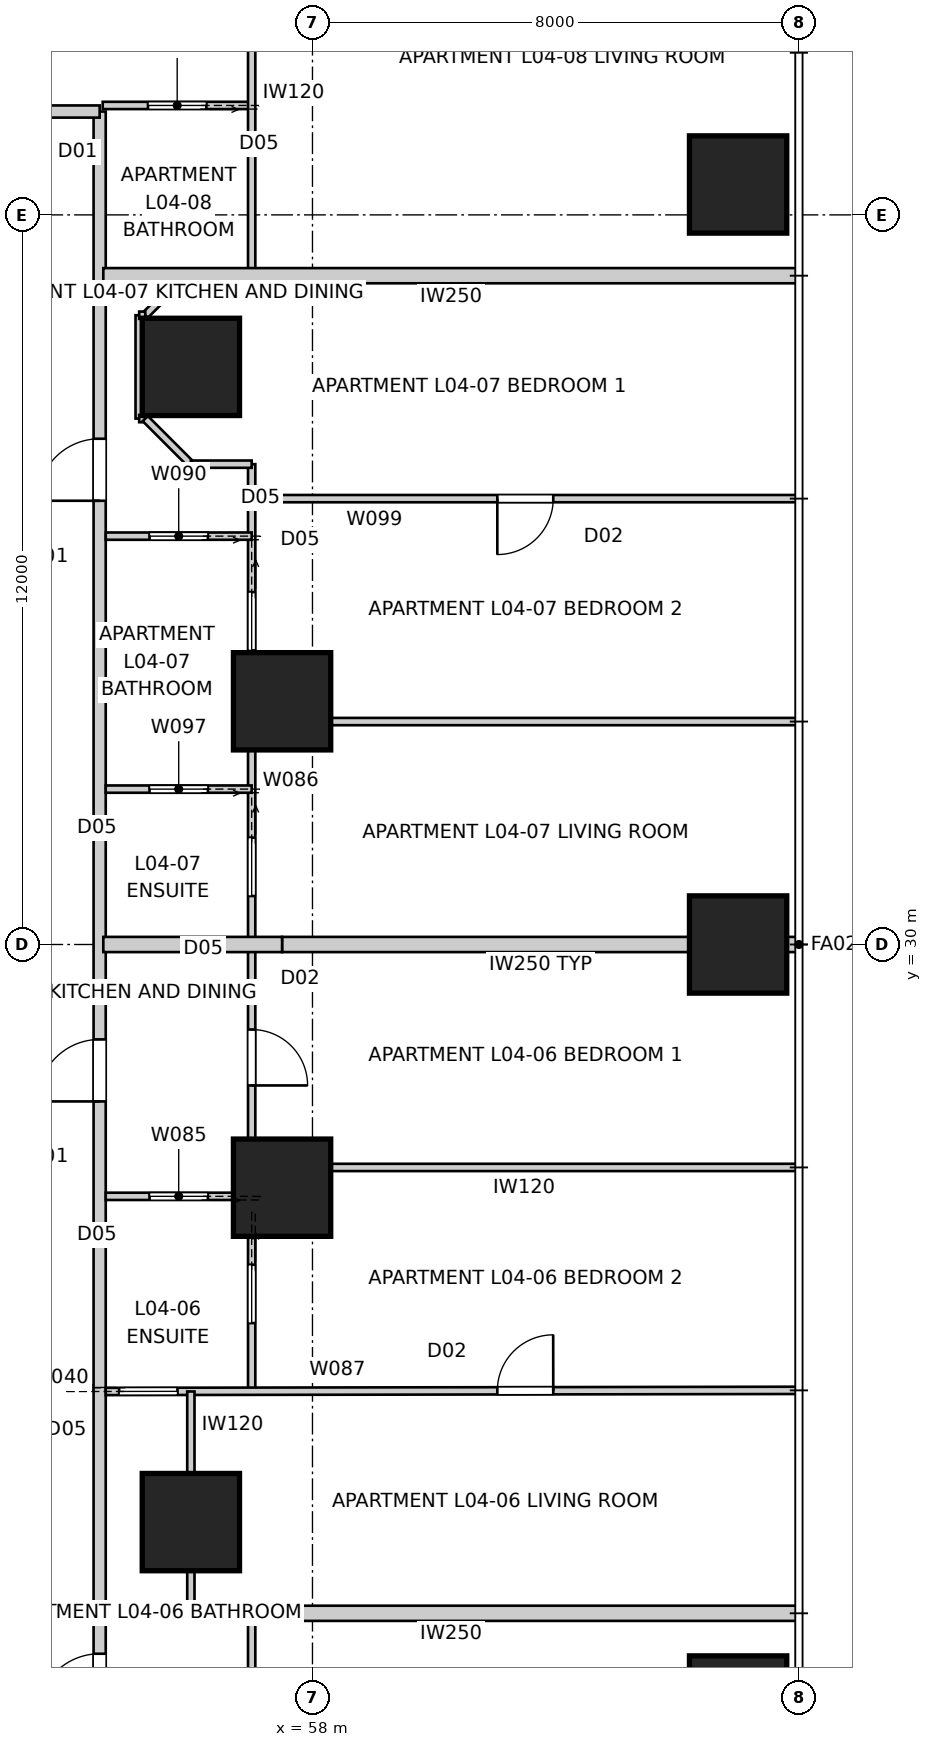
"""IFC4 building model, lengths in metres.
Left out: names, types, materials, properties, quantities, classifications, styles, units other than length and angle.
Written with IfcOpenShell. Run it as: python <this file> out.ifc"""

import sys

from ifc_helpers import new_model, si_unit, direction, frame, frame_2d, origin, origin_2d, place, context, subcontext, project, spatial, rectangle, extrude, element, fill, save


model = new_model("IFC4")
c1 = context("Model", 3, precision=1e-05, world=origin(), true_north=direction((0.0, 1.0)))
c2 = subcontext(c1, "Body", "Model", "MODEL_VIEW")
j1 = project(units=[si_unit("LENGTHUNIT", "METRE"), si_unit("PLANEANGLEUNIT", "RADIAN")], contexts=[c1])
p1 = place(None, origin())
s1 = spatial("IfcSite", under=j1, at=p1, CompositionType="ELEMENT")
p2 = place(p1, origin())
s2 = spatial("IfcBuilding", under=s1, at=p2, CompositionType="ELEMENT")
p3 = place(p2, frame((0.0, 0.0, 18.4)))
s3 = spatial("IfcBuildingStorey", under=s2, at=p3, CompositionType="ELEMENT", Elevation=18.4)
for number, where, z_axis, x_axis in (
    (1, (65.0, 17.5, 0.0), (0.0, 0.0, 1.0), (1.0, 0.0, 0.0)),
    (2, (65.0, 30.0, 0.0), (0.0, 0.0, 1.0), (1.0, 0.0, 0.0)),
    (3, (65.0, 42.5, 0.0), (0.0, 0.0, 1.0), (1.0, 0.0, 0.0)),
    (4, (57.5, 26.0, 0.0), (0.0, 0.0, 1.0), (1.0, 0.0, 0.0)),
    (5, (57.5, 34.0, 0.0), (0.0, 0.0, 1.0), (1.0, 0.0, 0.0)),
    (6, (56.0, 39.5, 0.0), (0.0, 0.0, 1.0), (1.0, 0.0, 0.0)),
    (7, (56.0, 20.5, 0.0), (0.0, 0.0, 1.0), (1.0, 0.0, 0.0)),
):
    element("IfcColumn", number, at=place(p3, frame(where, z_axis=z_axis, x_axis=x_axis)), inside=s3, PredefinedType="COLUMN", context=c2, shape_type="SweptSolid", body=[
        extrude(rectangle(XDim=1.6, YDim=1.6, at=origin_2d()), origin(), (0.0, 0.0, 1.0), 3.4),
    ])
p4 = place(p3, frame((54.5, 16.3, 0.0), z_axis=(0.0, 0.0, 1.0), x_axis=(0.0, 1.0, 0.0)))
e8 = element("IfcWall", 8, at=p4, inside=s3, PredefinedType="PARTITIONING", context=c2, shape_type="SweptSolid", body=[
    extrude(rectangle(XDim=27.4, YDim=0.2, at=frame_2d((13.7, 0.0))), origin(), (0.0, 0.0, 1.0), 3.25),
])
p5 = place(p4, frame((20.998, 0.0, 0.0)))
e9 = element("IfcOpeningElement", 9, at=p5, cuts=e8, PredefinedType="OPENING", context=c2, shape_type="SweptSolid", body=[
    extrude(rectangle(XDim=1.02, YDim=2.34, at=frame_2d((0.51, 1.17))), frame((0.0, 0.11, 0.0), z_axis=(0.0, -1.0, 0.0), x_axis=(1.0, 0.0, 0.0)), (0.0, 0.0, 1.0), 0.22),
])
p6 = place(p4, frame((11.119, 0.0, 0.0)))
e10 = element("IfcOpeningElement", 10, at=p6, cuts=e8, PredefinedType="OPENING", context=c2, shape_type="SweptSolid", body=[
    extrude(rectangle(XDim=1.02, YDim=2.34, at=frame_2d((0.51, 1.17))), frame((0.0, 0.11, 0.0), z_axis=(0.0, -1.0, 0.0), x_axis=(1.0, 0.0, 0.0)), (0.0, 0.0, 1.0), 0.22),
])
p7 = place(p4, frame((1.015, 0.0, 0.0)))
e11 = element("IfcOpeningElement", 11, at=p7, cuts=e8, PredefinedType="OPENING", context=c2, shape_type="SweptSolid", body=[
    extrude(rectangle(XDim=1.02, YDim=2.34, at=frame_2d((0.51, 1.17))), frame((0.0, 0.11, 0.0), z_axis=(0.0, -1.0, 0.0), x_axis=(1.0, 0.0, 0.0)), (0.0, 0.0, 1.0), 0.22),
])
p8 = place(p3, frame((54.5, 43.7, 0.0), z_axis=(0.0, 0.0, 1.0), x_axis=(-1.0, 0.0, 0.0)))
e12 = element("IfcWall", 12, at=p8, inside=s3, PredefinedType="PARTITIONING", context=c2, shape_type="SweptSolid", body=[
    extrude(rectangle(XDim=29.0, YDim=0.2, at=frame_2d((14.5, 0.0))), origin(), (0.0, 0.0, 1.0), 3.25),
])
p9 = place(p8, frame((22.253, 0.0, 0.0)))
e13 = element("IfcOpeningElement", 13, at=p9, cuts=e12, PredefinedType="OPENING", context=c2, shape_type="SweptSolid", body=[
    extrude(rectangle(XDim=1.02, YDim=2.34, at=frame_2d((0.51, 1.17))), frame((0.0, 0.11, 0.0), z_axis=(0.0, -1.0, 0.0), x_axis=(1.0, 0.0, 0.0)), (0.0, 0.0, 1.0), 0.22),
])
p10 = place(p8, frame((5.393, 0.0, 0.0)))
e14 = element("IfcOpeningElement", 14, at=p10, cuts=e12, PredefinedType="OPENING", context=c2, shape_type="SweptSolid", body=[
    extrude(rectangle(XDim=1.02, YDim=2.34, at=frame_2d((0.51, 1.17))), frame((0.0, 0.11, 0.0), z_axis=(0.0, -1.0, 0.0), x_axis=(1.0, 0.0, 0.0)), (0.0, 0.0, 1.0), 0.22),
])
p11 = place(p8, frame((1.281, 0.0, 0.0)))
e15 = element("IfcOpeningElement", 15, at=p11, cuts=e12, PredefinedType="OPENING", context=c2, shape_type="SweptSolid", body=[
    extrude(rectangle(XDim=1.02, YDim=2.34, at=frame_2d((0.51, 1.17))), frame((0.0, 0.11, 0.0), z_axis=(0.0, -1.0, 0.0), x_axis=(1.0, 0.0, 0.0)), (0.0, 0.0, 1.0), 0.22),
])
for number, where, z_axis, x_axis in (
    (16, (66.0, 19.0, 0.0), (0.0, 0.0, 1.0), (-1.0, 0.0, 0.0)),
    (17, (66.0, 41.0, 0.0), (0.0, 0.0, 1.0), (-1.0, 0.0, 0.0)),
):
    element("IfcWall", number, at=place(p3, frame(where, z_axis=z_axis, x_axis=x_axis)), inside=s3, PredefinedType="PARTITIONING", context=c2, shape_type="SweptSolid", body=[
        extrude(rectangle(XDim=11.44, YDim=0.25, at=frame_2d((5.72, 0.0))), origin(), (0.0, 0.0, 1.0), 3.25),
    ])
p12 = place(p3, frame((66.0, 30.0, 0.0), z_axis=(0.0, 0.0, 1.0), x_axis=(-1.0, 0.0, 0.0)))
e18 = element("IfcWall", 18, at=p12, inside=s3, PredefinedType="PARTITIONING", context=c2, shape_type="SweptSolid", body=[
    extrude(rectangle(XDim=8.5, YDim=0.25, at=frame_2d((4.25, 0.0))), origin(), (0.0, 0.0, 1.0), 3.25),
])
p13 = place(p3, frame((57.5, 30.0, 0.0), z_axis=(0.0, 0.0, 1.0), x_axis=(-1.0, 0.0, 0.0)))
e19 = element("IfcWall", 19, at=p13, inside=s3, PredefinedType="PARTITIONING", context=c2, shape_type="SweptSolid", body=[
    extrude(rectangle(XDim=2.94, YDim=0.25, at=frame_2d((1.47, 0.0))), origin(), (0.0, 0.0, 1.0), 2.795),
])
p14 = place(p3, frame((57.0, 19.0, 0.0), z_axis=(0.0, 0.0, 1.0), x_axis=(0.0, -1.0, 0.0)))
e20 = element("IfcWall", 20, at=p14, inside=s3, PredefinedType="PARTITIONING", context=c2, shape_type="SweptSolid", body=[
    extrude(rectangle(XDim=6.0, YDim=0.12, at=frame_2d((3.0, 0.0))), origin(), (0.0, 0.0, 1.0), 3.25),
])
p15 = place(p14, frame((2.54, 0.0, 0.0)))
e21 = element("IfcOpeningElement", 21, at=p15, cuts=e20, PredefinedType="OPENING", context=c2, shape_type="SweptSolid", body=[
    extrude(rectangle(XDim=0.92, YDim=2.34, at=frame_2d((0.46, 1.17))), frame((0.0, 0.07, 0.0), z_axis=(0.0, -1.0, 0.0), x_axis=(1.0, 0.0, 0.0)), (0.0, 0.0, 1.0), 0.14),
])
p16 = place(p3, frame((57.0, 25.858, 0.0), z_axis=(0.0, 0.0, 1.0), x_axis=(-1.0, 0.0, 0.0)))
e22 = element("IfcWall", 22, at=p16, inside=s3, PredefinedType="PARTITIONING", context=c2, shape_type="SweptSolid", body=[
    extrude(rectangle(XDim=2.4, YDim=0.12, at=frame_2d((1.2, 0.0))), origin(), (0.0, 0.0, 1.0), 3.25),
])
p17 = place(p16, frame((0.72, 0.0, 0.0)))
e23 = element("IfcOpeningElement", 23, at=p17, cuts=e22, PredefinedType="OPENING", context=c2, shape_type="SweptSolid", body=[
    extrude(rectangle(XDim=0.96, YDim=2.1, at=frame_2d((0.48, 1.05))), frame((0.0, 0.07, 0.0), z_axis=(0.0, -1.0, 0.0), x_axis=(1.0, 0.0, 0.0)), (0.0, 0.0, 1.0), 0.14),
])
p18 = place(p3, frame((57.0, 37.9, 0.0), z_axis=(0.0, 0.0, 1.0), x_axis=(0.0, -1.0, 0.0)))
e24 = element("IfcWall", 24, at=p18, inside=s3, PredefinedType="PARTITIONING", context=c2, shape_type="SweptSolid", body=[
    extrude(rectangle(XDim=15.251, YDim=0.12, at=frame_2d((7.625, 0.0))), origin(), (0.0, 0.0, 1.0), 2.55),
])
p19 = place(p18, frame((9.298, 0.0, 0.0)))
e25 = element("IfcOpeningElement", 25, at=p19, cuts=e24, PredefinedType="OPENING", context=c2, shape_type="SweptSolid", body=[
    extrude(rectangle(XDim=0.92, YDim=2.34, at=frame_2d((0.46, 1.17))), frame((0.0, 0.07, 0.0), z_axis=(0.0, -1.0, 0.0), x_axis=(1.0, 0.0, 0.0)), (0.0, 0.0, 1.0), 0.14),
])
p20 = place(p18, frame((2.104, 0.0, 0.0)))
e26 = element("IfcOpeningElement", 26, at=p20, cuts=e24, PredefinedType="OPENING", context=c2, shape_type="SweptSolid", body=[
    extrude(rectangle(XDim=0.96, YDim=2.1, at=frame_2d((0.48, 1.05))), frame((0.0, 0.07, 0.0), z_axis=(0.0, -1.0, 0.0), x_axis=(1.0, 0.0, 0.0)), (0.0, 0.0, 1.0), 0.14),
])
p21 = place(p18, frame((13.167, 0.0, 0.0)))
e27 = element("IfcOpeningElement", 27, at=p21, cuts=e24, PredefinedType="OPENING", context=c2, shape_type="SweptSolid", body=[
    extrude(rectangle(XDim=0.96, YDim=2.1, at=frame_2d((0.48, 1.05))), frame((0.0, 0.07, 0.0), z_axis=(0.0, -1.0, 0.0), x_axis=(1.0, 0.0, 0.0)), (0.0, 0.0, 1.0), 0.14),
])
p22 = place(p18, frame((6.142, 0.0, 0.0)))
e28 = element("IfcOpeningElement", 28, at=p22, cuts=e24, PredefinedType="OPENING", context=c2, shape_type="SweptSolid", body=[
    extrude(rectangle(XDim=0.96, YDim=2.1, at=frame_2d((0.48, 1.05))), frame((0.0, 0.07, 0.0), z_axis=(0.0, -1.0, 0.0), x_axis=(1.0, 0.0, 0.0)), (0.0, 0.0, 1.0), 0.14),
])
p23 = place(p3, frame((54.6, 22.649, 0.0), z_axis=(0.0, 0.0, 1.0), x_axis=(0.999998735361, 0.001590369792, 0.0)))
e29 = element("IfcWall", 29, at=p23, inside=s3, PredefinedType="PARTITIONING", context=c2, shape_type="SweptSolid", body=[
    extrude(rectangle(XDim=11.36, YDim=0.12, at=frame_2d((5.68, 0.0))), origin(), (0.0, 0.0, 1.0), 3.25),
])
p24 = place(p23, frame((0.22, 0.0, 0.0)))
e30 = element("IfcOpeningElement", 30, at=p24, cuts=e29, PredefinedType="OPENING", context=c2, shape_type="SweptSolid", body=[
    extrude(rectangle(XDim=0.96, YDim=2.1, at=frame_2d((0.48, 1.05))), frame((0.0, 0.07, 0.0), z_axis=(0.0, -1.0, 0.0), x_axis=(1.0, 0.0, 0.0)), (0.0, 0.0, 1.0), 0.14),
])
p25 = place(p23, frame((6.44, 0.0, 0.0)))
e31 = element("IfcOpeningElement", 31, at=p25, cuts=e29, PredefinedType="OPENING", context=c2, shape_type="SweptSolid", body=[
    extrude(rectangle(XDim=0.92, YDim=2.34, at=frame_2d((0.46, 1.17))), frame((0.0, 0.07, 0.0), z_axis=(0.0, -1.0, 0.0), x_axis=(1.0, 0.0, 0.0)), (0.0, 0.0, 1.0), 0.14),
])
p26 = place(p3, frame((56.0, 22.649, 0.0), z_axis=(0.0, 0.0, 1.0), x_axis=(0.0, -1.0, 0.0)))
e32 = element("IfcWall", 32, at=p26, inside=s3, PredefinedType="PARTITIONING", context=c2, shape_type="SweptSolid", body=[
    extrude(rectangle(XDim=3.649, YDim=0.12, at=frame_2d((1.824, 0.0))), origin(), (0.0, 0.0, 1.0), 2.55),
])
p27 = place(p3, frame((65.96, 26.333, 0.0), z_axis=(0.0, 0.0, 1.0), x_axis=(-1.0, 0.0, 0.0)))
e33 = element("IfcWall", 33, at=p27, inside=s3, PredefinedType="PARTITIONING", context=c2, shape_type="SweptSolid", body=[
    extrude(rectangle(XDim=8.96, YDim=0.12, at=frame_2d((4.48, 0.0))), origin(), (0.0, 0.0, 1.0), 3.25),
])
p28 = place(p3, frame((57.0, 36.716, 0.0), z_axis=(0.0, 0.0, 1.0), x_axis=(-1.0, 0.0, 0.0)))
e34 = element("IfcWall", 34, at=p28, inside=s3, PredefinedType="PARTITIONING", context=c2, shape_type="SweptSolid", body=[
    extrude(rectangle(XDim=2.4, YDim=0.12, at=frame_2d((1.2, 0.0))), origin(), (0.0, 0.0, 1.0), 3.25),
])
p29 = place(p28, frame((0.72, 0.0, 0.0)))
e35 = element("IfcOpeningElement", 35, at=p29, cuts=e34, PredefinedType="OPENING", context=c2, shape_type="SweptSolid", body=[
    extrude(rectangle(XDim=0.96, YDim=2.1, at=frame_2d((0.48, 1.05))), frame((0.0, 0.07, 0.0), z_axis=(0.0, -1.0, 0.0), x_axis=(1.0, 0.0, 0.0)), (0.0, 0.0, 1.0), 0.14),
])
p30 = place(p3, frame((55.9, 41.0, 0.0), z_axis=(0.0, 0.0, 1.0), x_axis=(-0.707106781187, -0.707106781187, 0.0)))
e36 = element("IfcWall", 36, at=p30, inside=s3, PredefinedType="PARTITIONING", context=c2, shape_type="SweptSolid", body=[
    extrude(rectangle(XDim=0.919, YDim=0.12, at=frame_2d((0.459, 0.0))), origin(), (0.0, 0.0, 1.0), 3.25),
])
p31 = place(p3, frame((55.15, 40.35, 0.0), z_axis=(0.0, 0.0, 1.0), x_axis=(0.0, -1.0, 0.0)))
e37 = element("IfcWall", 37, at=p31, inside=s3, PredefinedType="PARTITIONING", context=c2, shape_type="SweptSolid", body=[
    extrude(rectangle(XDim=1.7, YDim=0.12, at=frame_2d((0.85, 0.0))), origin(), (0.0, 0.0, 1.0), 3.25),
])
p32 = place(p3, frame((55.25, 38.65, 0.0), z_axis=(0.0, 0.0, 1.0), x_axis=(0.707106781187, -0.707106781187, 0.0)))
e38 = element("IfcWall", 38, at=p32, inside=s3, PredefinedType="PARTITIONING", context=c2, shape_type="SweptSolid", body=[
    extrude(rectangle(XDim=1.061, YDim=0.12, at=frame_2d((0.53, 0.0))), origin(), (0.0, 0.0, 1.0), 3.25),
])
p33 = place(p3, frame((56.0, 37.9, 0.0), z_axis=(0.0, 0.0, 1.0), x_axis=(1.0, 0.0, 0.0)))
e39 = element("IfcWall", 39, at=p33, inside=s3, PredefinedType="PARTITIONING", context=c2, shape_type="SweptSolid", body=[
    extrude(rectangle(XDim=1.0, YDim=0.12, at=frame_2d((0.5, 0.0))), origin(), (0.0, 0.0, 1.0), 3.25),
])
p34 = place(p3, frame((57.0, 32.555, 0.0), z_axis=(0.0, 0.0, 1.0), x_axis=(-1.0, 0.0, 0.0)))
e40 = element("IfcWall", 40, at=p34, inside=s3, PredefinedType="PARTITIONING", context=c2, shape_type="SweptSolid", body=[
    extrude(rectangle(XDim=2.4, YDim=0.12, at=frame_2d((1.2, 0.0))), origin(), (0.0, 0.0, 1.0), 3.25),
])
p35 = place(p34, frame((0.72, 0.0, 0.0)))
e41 = element("IfcOpeningElement", 41, at=p35, cuts=e40, PredefinedType="OPENING", context=c2, shape_type="SweptSolid", body=[
    extrude(rectangle(XDim=0.96, YDim=2.1, at=frame_2d((0.48, 1.05))), frame((0.0, 0.07, 0.0), z_axis=(0.0, -1.0, 0.0), x_axis=(1.0, 0.0, 0.0)), (0.0, 0.0, 1.0), 0.14),
])
p36 = place(p3, frame((57.0, 33.667, 0.0), z_axis=(0.0, 0.0, 1.0), x_axis=(1.0, 0.0, 0.0)))
e42 = element("IfcWall", 42, at=p36, inside=s3, PredefinedType="PARTITIONING", context=c2, shape_type="SweptSolid", body=[
    extrude(rectangle(XDim=8.96, YDim=0.12, at=frame_2d((4.48, 0.0))), origin(), (0.0, 0.0, 1.0), 3.25),
])
p37 = place(p3, frame((65.96, 37.333, 0.0), z_axis=(0.0, 0.0, 1.0), x_axis=(-1.0, 0.0, 0.0)))
e43 = element("IfcWall", 43, at=p37, inside=s3, PredefinedType="PARTITIONING", context=c2, shape_type="SweptSolid", body=[
    extrude(rectangle(XDim=8.96, YDim=0.12, at=frame_2d((4.48, 0.0))), origin(), (0.0, 0.0, 1.0), 3.25),
])
p38 = place(p37, frame((4.0, 0.0, 0.0)))
e44 = element("IfcOpeningElement", 44, at=p38, cuts=e43, PredefinedType="OPENING", context=c2, shape_type="SweptSolid", body=[
    extrude(rectangle(XDim=0.92, YDim=2.34, at=frame_2d((0.46, 1.17))), frame((0.0, 0.07, 0.0), z_axis=(0.0, -1.0, 0.0), x_axis=(1.0, 0.0, 0.0)), (0.0, 0.0, 1.0), 0.14),
])
p39 = place(p3, frame((57.0, 43.8, 0.0), z_axis=(0.0, 0.0, 1.0), x_axis=(-1.0, 0.0, 0.0)))
e45 = element("IfcWall", 45, at=p39, inside=s3, PredefinedType="PARTITIONING", context=c2, shape_type="SweptSolid", body=[
    extrude(rectangle(XDim=2.45, YDim=0.12, at=frame_2d((1.225, 0.0))), origin(), (0.0, 0.0, 1.0), 3.25),
])
p40 = place(p39, frame((0.745, 0.0, 0.0)))
e46 = element("IfcOpeningElement", 46, at=p40, cuts=e45, PredefinedType="OPENING", context=c2, shape_type="SweptSolid", body=[
    extrude(rectangle(XDim=0.96, YDim=2.1, at=frame_2d((0.48, 1.05))), frame((0.0, 0.07, 0.0), z_axis=(0.0, -1.0, 0.0), x_axis=(1.0, 0.0, 0.0)), (0.0, 0.0, 1.0), 0.14),
])
p41 = place(p3, frame((57.0, 47.0, 0.0), z_axis=(0.0, 0.0, 1.0), x_axis=(0.0, -1.0, 0.0)))
e47 = element("IfcWall", 47, at=p41, inside=s3, PredefinedType="PARTITIONING", context=c2, shape_type="SweptSolid", body=[
    extrude(rectangle(XDim=6.0, YDim=0.12, at=frame_2d((3.0, 0.0))), origin(), (0.0, 0.0, 1.0), 3.25),
])
for number, where, z_axis, x_axis in (
    (48, (55.15, 40.35, 0.0), (0.0, 0.0, 1.0), (1.0, 0.0, 0.0)),
    (49, (55.15, 38.65, 0.0), (0.0, 0.0, 1.0), (1.0, 0.0, 0.0)),
):
    element("IfcWall", number, at=place(p3, frame(where, z_axis=z_axis, x_axis=x_axis)), inside=s3, PredefinedType="PARTITIONING", context=c2, shape_type="SweptSolid", body=[
        extrude(rectangle(XDim=0.1, YDim=0.12, at=frame_2d((0.05, 0.0))), origin(), (0.0, 0.0, 1.0), 3.25),
    ])
p42 = place(p5, origin())
e50 = element("IfcDoor", 50, at=p42, inside=s3, OperationType="SINGLE_SWING_LEFT", PredefinedType="DOOR", context=c2, shape_type="SweptSolid", body=[
    extrude(rectangle(XDim=1.02, YDim=2.34, at=frame_2d((0.51, 1.17))), frame((0.0, 0.025, 0.0), z_axis=(0.0, -1.0, 0.0), x_axis=(1.0, 0.0, 0.0)), (0.0, 0.0, 1.0), 0.05),
])
fill(e9, e50)
p43 = place(p6, origin())
e51 = element("IfcDoor", 51, at=p43, inside=s3, OperationType="SINGLE_SWING_LEFT", PredefinedType="DOOR", context=c2, shape_type="SweptSolid", body=[
    extrude(rectangle(XDim=1.02, YDim=2.34, at=frame_2d((0.51, 1.17))), frame((0.0, 0.025, 0.0), z_axis=(0.0, -1.0, 0.0), x_axis=(1.0, 0.0, 0.0)), (0.0, 0.0, 1.0), 0.05),
])
fill(e10, e51)
p44 = place(p7, origin())
e52 = element("IfcDoor", 52, at=p44, inside=s3, OperationType="SINGLE_SWING_LEFT", PredefinedType="DOOR", context=c2, shape_type="SweptSolid", body=[
    extrude(rectangle(XDim=1.02, YDim=2.34, at=frame_2d((0.51, 1.17))), frame((0.0, 0.025, 0.0), z_axis=(0.0, -1.0, 0.0), x_axis=(1.0, 0.0, 0.0)), (0.0, 0.0, 1.0), 0.05),
])
fill(e11, e52)
p45 = place(p29, origin())
e53 = element("IfcDoor", 53, at=p45, inside=s3, OperationType="SLIDING_TO_LEFT", PredefinedType="DOOR", context=c2, shape_type="SweptSolid", body=[
    extrude(rectangle(XDim=0.96, YDim=2.1, at=frame_2d((0.48, 1.05))), frame((0.0, 0.025, 0.0), z_axis=(0.0, -1.0, 0.0), x_axis=(1.0, 0.0, 0.0)), (0.0, 0.0, 1.0), 0.05),
])
fill(e35, e53)
p46 = place(p19, origin())
e54 = element("IfcDoor", 54, at=p46, inside=s3, OperationType="SINGLE_SWING_RIGHT", PredefinedType="DOOR", context=c2, shape_type="SweptSolid", body=[
    extrude(rectangle(XDim=0.92, YDim=2.34, at=frame_2d((0.46, 1.17))), frame((0.0, 0.025, 0.0), z_axis=(0.0, -1.0, 0.0), x_axis=(1.0, 0.0, 0.0)), (0.0, 0.0, 1.0), 0.05),
])
fill(e25, e54)
p47 = place(p17, origin())
e55 = element("IfcDoor", 55, at=p47, inside=s3, OperationType="SLIDING_TO_LEFT", PredefinedType="DOOR", context=c2, shape_type="SweptSolid", body=[
    extrude(rectangle(XDim=0.96, YDim=2.1, at=frame_2d((0.48, 1.05))), frame((0.0, 0.025, 0.0), z_axis=(0.0, -1.0, 0.0), x_axis=(1.0, 0.0, 0.0)), (0.0, 0.0, 1.0), 0.05),
])
fill(e23, e55)
p48 = place(p40, origin())
e56 = element("IfcDoor", 56, at=p48, inside=s3, OperationType="SLIDING_TO_LEFT", PredefinedType="DOOR", context=c2, shape_type="SweptSolid", body=[
    extrude(rectangle(XDim=0.96, YDim=2.1, at=frame_2d((0.48, 1.05))), frame((0.0, 0.025, 0.0), z_axis=(0.0, -1.0, 0.0), x_axis=(1.0, 0.0, 0.0)), (0.0, 0.0, 1.0), 0.05),
])
fill(e46, e56)
p49 = place(p20, origin())
e57 = element("IfcDoor", 57, at=p49, inside=s3, OperationType="SLIDING_TO_LEFT", PredefinedType="DOOR", context=c2, shape_type="SweptSolid", body=[
    extrude(rectangle(XDim=0.96, YDim=2.1, at=frame_2d((0.48, 1.05))), frame((0.0, 0.025, 0.0), z_axis=(0.0, -1.0, 0.0), x_axis=(1.0, 0.0, 0.0)), (0.0, 0.0, 1.0), 0.05),
])
fill(e26, e57)
p50 = place(p35, origin())
e58 = element("IfcDoor", 58, at=p50, inside=s3, OperationType="SLIDING_TO_LEFT", PredefinedType="DOOR", context=c2, shape_type="SweptSolid", body=[
    extrude(rectangle(XDim=0.96, YDim=2.1, at=frame_2d((0.48, 1.05))), frame((0.0, 0.025, 0.0), z_axis=(0.0, -1.0, 0.0), x_axis=(1.0, 0.0, 0.0)), (0.0, 0.0, 1.0), 0.05),
])
fill(e41, e58)
p51 = place(p21, origin())
e59 = element("IfcDoor", 59, at=p51, inside=s3, OperationType="SLIDING_TO_LEFT", PredefinedType="DOOR", context=c2, shape_type="SweptSolid", body=[
    extrude(rectangle(XDim=0.96, YDim=2.1, at=frame_2d((0.48, 1.05))), frame((0.0, 0.025, 0.0), z_axis=(0.0, -1.0, 0.0), x_axis=(1.0, 0.0, 0.0)), (0.0, 0.0, 1.0), 0.05),
])
fill(e27, e59)
p52 = place(p24, origin())
e60 = element("IfcDoor", 60, at=p52, inside=s3, OperationType="SLIDING_TO_LEFT", PredefinedType="DOOR", context=c2, shape_type="SweptSolid", body=[
    extrude(rectangle(XDim=0.96, YDim=2.1, at=frame_2d((0.48, 1.05))), frame((0.0, 0.025, 0.0), z_axis=(0.0, -1.0, 0.0), x_axis=(1.0, 0.0, 0.0)), (0.0, 0.0, 1.0), 0.05),
])
fill(e30, e60)
p53 = place(p22, origin())
e61 = element("IfcDoor", 61, at=p53, inside=s3, OperationType="SLIDING_TO_LEFT", PredefinedType="DOOR", context=c2, shape_type="SweptSolid", body=[
    extrude(rectangle(XDim=0.96, YDim=2.1, at=frame_2d((0.48, 1.05))), frame((0.0, 0.025, 0.0), z_axis=(0.0, -1.0, 0.0), x_axis=(1.0, 0.0, 0.0)), (0.0, 0.0, 1.0), 0.05),
])
fill(e28, e61)
p54 = place(p38, origin())
e62 = element("IfcDoor", 62, at=p54, inside=s3, OperationType="SINGLE_SWING_RIGHT", PredefinedType="DOOR", context=c2, shape_type="SweptSolid", body=[
    extrude(rectangle(XDim=0.92, YDim=2.34, at=frame_2d((0.46, 1.17))), frame((0.0, 0.025, 0.0), z_axis=(0.0, -1.0, 0.0), x_axis=(1.0, 0.0, 0.0)), (0.0, 0.0, 1.0), 0.05),
])
fill(e44, e62)
p55 = place(p25, origin())
e63 = element("IfcDoor", 63, at=p55, inside=s3, OperationType="SINGLE_SWING_RIGHT", PredefinedType="DOOR", context=c2, shape_type="SweptSolid", body=[
    extrude(rectangle(XDim=0.92, YDim=2.34, at=frame_2d((0.46, 1.17))), frame((0.0, 0.025, 0.0), z_axis=(0.0, -1.0, 0.0), x_axis=(1.0, 0.0, 0.0)), (0.0, 0.0, 1.0), 0.05),
])
fill(e31, e63)
save(model, sys.argv[1])
